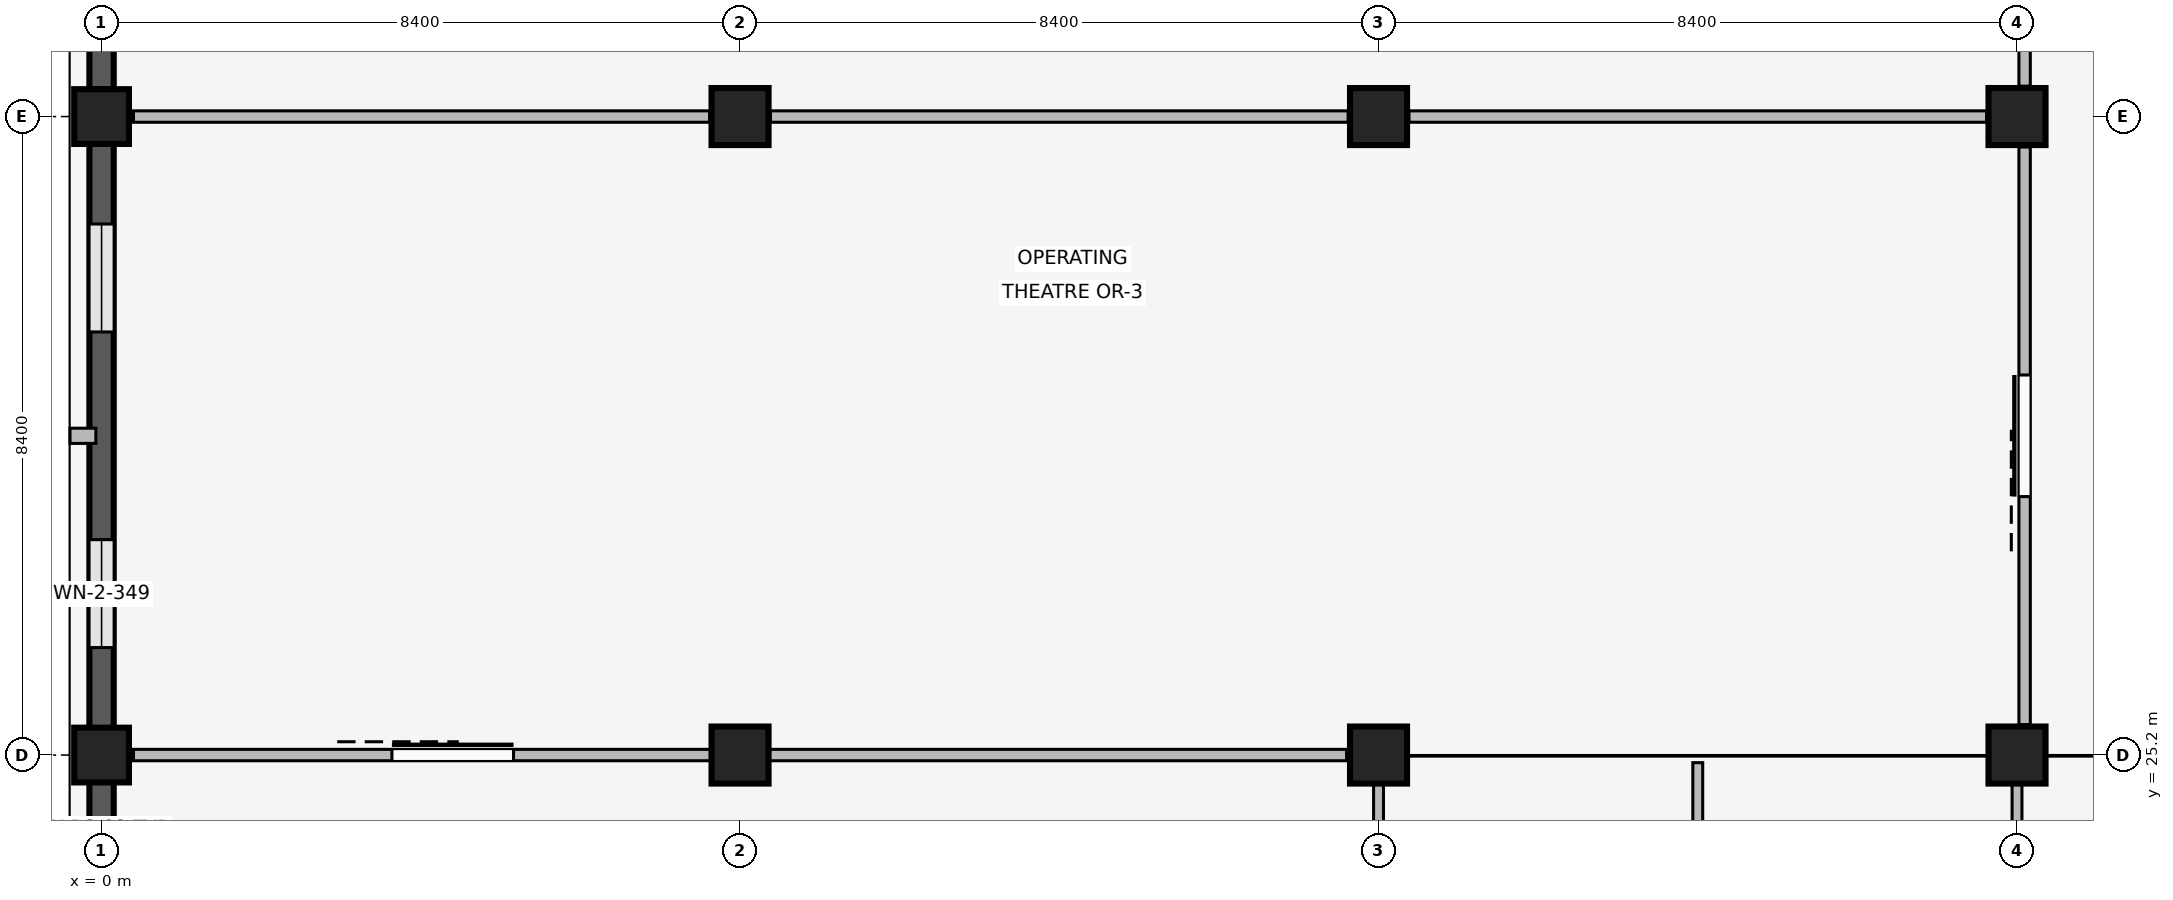
"""IFC4 building model, lengths in metres.
Left out: names, types, materials, properties, quantities, classifications, styles, units other than length and angle.
Written with IfcOpenShell. Run it as: python <this file> out.ifc"""

import sys

from ifc_helpers import new_model, si_unit, direction, frame, frame_2d, origin, origin_2d, place, context, subcontext, project, spatial, rectangle, extrude, element, fill, save


model = new_model("IFC4")
c1 = context("Model", 3, precision=1e-05, world=origin(), true_north=direction((0.0, 1.0)))
c2 = subcontext(c1, "Body", "Model", "MODEL_VIEW")
j1 = project(units=[si_unit("LENGTHUNIT", "METRE"), si_unit("PLANEANGLEUNIT", "RADIAN")], contexts=[c1])
p1 = place(None, origin())
s1 = spatial("IfcSite", under=j1, at=p1, CompositionType="ELEMENT")
p2 = place(p1, origin())
s2 = spatial("IfcBuilding", under=s1, at=p2, CompositionType="ELEMENT")
p3 = place(p2, frame((0.0, 0.0, 8.1)))
s3 = spatial("IfcBuildingStorey", under=s2, at=p3, CompositionType="ELEMENT", Elevation=8.1)
for number, where, z_axis, x_axis in (
    (1, (0.0, 25.2, 0.0), (0.0, 0.0, 1.0), (1.0, 0.0, 0.0)),
    (2, (0.0, 33.6, 0.0), (0.0, 0.0, 1.0), (1.0, 0.0, 0.0)),
):
    element("IfcColumn", number, at=place(p3, frame(where, z_axis=z_axis, x_axis=x_axis)), inside=s3, PredefinedType="COLUMN", context=c2, shape_type="SweptSolid", body=[
        extrude(rectangle(XDim=0.72, YDim=0.72, at=origin_2d()), origin(), (0.0, 0.0, 1.0), 4.8),
    ])
for number, where, z_axis, x_axis in (
    (3, (8.4, 25.2, 0.0), (0.0, 0.0, 1.0), (1.0, 0.0, 0.0)),
    (4, (8.4, 33.6, 0.0), (0.0, 0.0, 1.0), (1.0, 0.0, 0.0)),
    (5, (16.8, 25.2, 0.0), (0.0, 0.0, 1.0), (1.0, 0.0, 0.0)),
    (6, (16.8, 33.6, 0.0), (0.0, 0.0, 1.0), (1.0, 0.0, 0.0)),
    (7, (25.2, 25.2, 0.0), (0.0, 0.0, 1.0), (1.0, 0.0, 0.0)),
    (8, (25.2, 33.6, 0.0), (0.0, 0.0, 1.0), (1.0, 0.0, 0.0)),
):
    element("IfcColumn", number, at=place(p3, frame(where, z_axis=z_axis, x_axis=x_axis)), inside=s3, PredefinedType="COLUMN", context=c2, shape_type="SweptSolid", body=[
        extrude(rectangle(XDim=0.75, YDim=0.75, at=origin_2d()), origin(), (0.0, 0.0, 1.0), 4.8),
    ])
p4 = place(p3, frame((0.0, 17.155, 0.0), z_axis=(0.0, 0.0, 1.0), x_axis=(0.0, 1.0, 0.0)))
e9 = element("IfcWall", 9, at=p4, inside=s3, PredefinedType="SOLIDWALL", context=c2, shape_type="SweptSolid", body=[
    extrude(rectangle(XDim=7.69, YDim=0.32, at=frame_2d((3.845, 0.0))), origin(), (0.0, 0.0, 1.0), 3.86),
])
p5 = place(p4, frame((1.029, 0.0, 0.85)))
e10 = element("IfcOpeningElement", 10, at=p5, cuts=e9, PredefinedType="OPENING", context=c2, shape_type="SweptSolid", body=[
    extrude(rectangle(XDim=1.48, YDim=1.6, at=frame_2d((0.74, 0.8))), frame((0.0, 0.17, 0.0), z_axis=(0.0, -1.0, 0.0), x_axis=(1.0, 0.0, 0.0)), (0.0, 0.0, 1.0), 0.34),
])
p6 = place(p4, frame((5.181, 0.0, 0.85)))
e11 = element("IfcOpeningElement", 11, at=p6, cuts=e9, PredefinedType="OPENING", context=c2, shape_type="SweptSolid", body=[
    extrude(rectangle(XDim=1.48, YDim=1.6, at=frame_2d((0.74, 0.8))), frame((0.0, 0.17, 0.0), z_axis=(0.0, -1.0, 0.0), x_axis=(1.0, 0.0, 0.0)), (0.0, 0.0, 1.0), 0.34),
])
p7 = place(p3, frame((0.0, 25.555, 0.0), z_axis=(0.0, 0.0, 1.0), x_axis=(0.0, 1.0, 0.0)))
e12 = element("IfcWall", 12, at=p7, inside=s3, PredefinedType="SOLIDWALL", context=c2, shape_type="SweptSolid", body=[
    extrude(rectangle(XDim=7.69, YDim=0.32, at=frame_2d((3.845, 0.0))), origin(), (0.0, 0.0, 1.0), 3.86),
])
p8 = place(p7, frame((1.059, 0.0, 0.85)))
e13 = element("IfcOpeningElement", 13, at=p8, cuts=e12, PredefinedType="OPENING", context=c2, shape_type="SweptSolid", body=[
    extrude(rectangle(XDim=1.42, YDim=1.45, at=frame_2d((0.71, 0.725))), frame((0.0, 0.17, 0.0), z_axis=(0.0, -1.0, 0.0), x_axis=(1.0, 0.0, 0.0)), (0.0, 0.0, 1.0), 0.34),
])
p9 = place(p7, frame((5.211, 0.0, 0.85)))
e14 = element("IfcOpeningElement", 14, at=p9, cuts=e12, PredefinedType="OPENING", context=c2, shape_type="SweptSolid", body=[
    extrude(rectangle(XDim=1.42, YDim=1.45, at=frame_2d((0.71, 0.725))), frame((0.0, 0.17, 0.0), z_axis=(0.0, -1.0, 0.0), x_axis=(1.0, 0.0, 0.0)), (0.0, 0.0, 1.0), 0.34),
])
p10 = place(p3, frame((-0.075, 29.4, 0.0), z_axis=(0.0, 0.0, 1.0), x_axis=(-1.0, 0.0, 0.0)))
e15 = element("IfcWall", 15, at=p10, inside=s3, PredefinedType="ELEMENTEDWALL", context=c2, shape_type="SweptSolid", body=[
    extrude(rectangle(XDim=0.34, YDim=0.2, at=frame_2d((0.17, 0.0))), origin(), (0.0, 0.0, 1.0), 3.84),
])
p11 = place(p3, frame((0.0, 33.955, 0.0), z_axis=(0.0, 0.0, 1.0), x_axis=(0.0, 1.0, 0.0)))
e16 = element("IfcWall", 16, at=p11, inside=s3, PredefinedType="SOLIDWALL", context=c2, shape_type="SweptSolid", body=[
    extrude(rectangle(XDim=7.69, YDim=0.32, at=frame_2d((3.845, 0.0))), origin(), (0.0, 0.0, 1.0), 3.86),
])
p12 = place(p11, frame((0.939, 0.0, 0.85)))
e17 = element("IfcOpeningElement", 17, at=p12, cuts=e16, PredefinedType="OPENING", context=c2, shape_type="SweptSolid", body=[
    extrude(rectangle(XDim=1.66, YDim=1.95, at=frame_2d((0.83, 0.975))), frame((0.0, 0.17, 0.0), z_axis=(0.0, -1.0, 0.0), x_axis=(1.0, 0.0, 0.0)), (0.0, 0.0, 1.0), 0.34),
])
p13 = place(p11, frame((5.091, 0.0, 0.85)))
e18 = element("IfcOpeningElement", 18, at=p13, cuts=e16, PredefinedType="OPENING", context=c2, shape_type="SweptSolid", body=[
    extrude(rectangle(XDim=1.66, YDim=1.95, at=frame_2d((0.83, 0.975))), frame((0.0, 0.17, 0.0), z_axis=(0.0, -1.0, 0.0), x_axis=(1.0, 0.0, 0.0)), (0.0, 0.0, 1.0), 0.34),
])
p14 = place(p3, frame((16.8, 14.12, 0.0), z_axis=(0.0, 0.0, 1.0), x_axis=(0.0, 1.0, 0.0)))
e19 = element("IfcWall", 19, at=p14, inside=s3, PredefinedType="PARTITIONING", context=c2, shape_type="SweptSolid", body=[
    extrude(rectangle(XDim=10.94, YDim=0.13, at=frame_2d((5.47, 0.0))), origin(), (0.0, 0.0, 1.0), 3.84),
])
p15 = place(p3, frame((21.0, 14.17, 0.0), z_axis=(0.0, 0.0, 1.0), x_axis=(0.0, 1.0, 0.0)))
e20 = element("IfcWall", 20, at=p15, inside=s3, PredefinedType="PARTITIONING", context=c2, shape_type="SweptSolid", body=[
    extrude(rectangle(XDim=10.93, YDim=0.13, at=frame_2d((5.465, 0.0))), origin(), (0.0, 0.0, 1.0), 3.84),
])
p16 = place(p3, frame((25.2, 14.12, 0.0), z_axis=(0.0, 0.0, 1.0), x_axis=(0.0, 1.0, 0.0)))
e21 = element("IfcWall", 21, at=p16, inside=s3, PredefinedType="PARTITIONING", context=c2, shape_type="SweptSolid", body=[
    extrude(rectangle(XDim=10.94, YDim=0.13, at=frame_2d((5.47, 0.0))), origin(), (0.0, 0.0, 1.0), 3.84),
])
p17 = place(p3, frame((0.42, 25.2, 0.0), z_axis=(0.0, 0.0, 1.0), x_axis=(1.0, 0.0, 0.0)))
e22 = element("IfcWall", 22, at=p17, inside=s3, PredefinedType="PARTITIONING", context=c2, shape_type="SweptSolid", body=[
    extrude(rectangle(XDim=15.96, YDim=0.15, at=frame_2d((7.98, 0.0))), origin(), (0.0, 0.0, 1.0), 3.84),
])
p18 = place(p17, frame((3.4, 0.0, 0.0)))
e23 = element("IfcOpeningElement", 23, at=p18, cuts=e22, PredefinedType="OPENING", context=c2, shape_type="SweptSolid", body=[
    extrude(rectangle(XDim=1.6, YDim=2.35, at=frame_2d((0.8, 1.175))), frame((0.0, 0.085, 0.0), z_axis=(0.0, -1.0, 0.0), x_axis=(1.0, 0.0, 0.0)), (0.0, 0.0, 1.0), 0.17),
])
p19 = place(p3, frame((25.3, 25.6, 0.0), z_axis=(0.0, 0.0, 1.0), x_axis=(0.0, 1.0, 0.0)))
e24 = element("IfcWall", 24, at=p19, inside=s3, PredefinedType="PARTITIONING", context=c2, shape_type="SweptSolid", body=[
    extrude(rectangle(XDim=7.6, YDim=0.15, at=frame_2d((3.8, 0.0))), origin(), (0.0, 0.0, 1.0), 3.84),
])
p20 = place(p19, frame((3.0, 0.0, 0.0)))
e25 = element("IfcOpeningElement", 25, at=p20, cuts=e24, PredefinedType="OPENING", context=c2, shape_type="SweptSolid", body=[
    extrude(rectangle(XDim=1.6, YDim=2.35, at=frame_2d((0.8, 1.175))), frame((0.0, 0.085, 0.0), z_axis=(0.0, -1.0, 0.0), x_axis=(1.0, 0.0, 0.0)), (0.0, 0.0, 1.0), 0.17),
])
p21 = place(p3, frame((25.3, 34.0, 0.0), z_axis=(0.0, 0.0, 1.0), x_axis=(0.0, 1.0, 0.0)))
e26 = element("IfcWall", 26, at=p21, inside=s3, PredefinedType="PARTITIONING", context=c2, shape_type="SweptSolid", body=[
    extrude(rectangle(XDim=7.6, YDim=0.15, at=frame_2d((3.8, 0.0))), origin(), (0.0, 0.0, 1.0), 3.84),
])
p22 = place(p21, frame((3.0, 0.0, 0.0)))
e27 = element("IfcOpeningElement", 27, at=p22, cuts=e26, PredefinedType="OPENING", context=c2, shape_type="SweptSolid", body=[
    extrude(rectangle(XDim=1.6, YDim=2.35, at=frame_2d((0.8, 1.175))), frame((0.0, 0.085, 0.0), z_axis=(0.0, -1.0, 0.0), x_axis=(1.0, 0.0, 0.0)), (0.0, 0.0, 1.0), 0.17),
])
p23 = place(p3, frame((0.42, 33.6, 0.0), z_axis=(0.0, 0.0, 1.0), x_axis=(1.0, 0.0, 0.0)))
e28 = element("IfcWall", 28, at=p23, inside=s3, PredefinedType="PARTITIONING", context=c2, shape_type="SweptSolid", body=[
    extrude(rectangle(XDim=7.58, YDim=0.15, at=frame_2d((3.79, 0.0))), origin(), (0.0, 0.0, 1.0), 3.84),
])
p24 = place(p3, frame((8.8, 33.6, 0.0), z_axis=(0.0, 0.0, 1.0), x_axis=(1.0, 0.0, 0.0)))
e29 = element("IfcWall", 29, at=p24, inside=s3, PredefinedType="PARTITIONING", context=c2, shape_type="SweptSolid", body=[
    extrude(rectangle(XDim=7.6, YDim=0.15, at=frame_2d((3.8, 0.0))), origin(), (0.0, 0.0, 1.0), 3.84),
])
p25 = place(p3, frame((17.2, 33.6, 0.0), z_axis=(0.0, 0.0, 1.0), x_axis=(1.0, 0.0, 0.0)))
e30 = element("IfcWall", 30, at=p25, inside=s3, PredefinedType="PARTITIONING", context=c2, shape_type="SweptSolid", body=[
    extrude(rectangle(XDim=7.6, YDim=0.15, at=frame_2d((3.8, 0.0))), origin(), (0.0, 0.0, 1.0), 3.84),
])
p26 = place(p8, origin())
e31 = element("IfcWindow", 31, at=p26, inside=s3, PartitioningType="SINGLE_PANEL", PredefinedType="WINDOW", context=c2, shape_type="SweptSolid", body=[
    extrude(rectangle(XDim=1.42, YDim=1.45, at=frame_2d((0.71, 0.725))), frame((0.0, 0.03, 0.0), z_axis=(0.0, -1.0, 0.0), x_axis=(1.0, 0.0, 0.0)), (0.0, 0.0, 1.0), 0.06),
])
fill(e13, e31)
p27 = place(p9, origin())
e32 = element("IfcWindow", 32, at=p27, inside=s3, PartitioningType="SINGLE_PANEL", PredefinedType="WINDOW", context=c2, shape_type="SweptSolid", body=[
    extrude(rectangle(XDim=1.42, YDim=1.45, at=frame_2d((0.71, 0.725))), frame((0.0, 0.03, 0.0), z_axis=(0.0, -1.0, 0.0), x_axis=(1.0, 0.0, 0.0)), (0.0, 0.0, 1.0), 0.06),
])
fill(e14, e32)
p28 = place(p18, origin())
e33 = element("IfcDoor", 33, at=p28, inside=s3, OperationType="SLIDING_TO_LEFT", PredefinedType="DOOR", context=c2, shape_type="SweptSolid", body=[
    extrude(rectangle(XDim=1.6, YDim=2.35, at=frame_2d((0.8, 1.175))), frame((0.0, 0.025, 0.0), z_axis=(0.0, -1.0, 0.0), x_axis=(1.0, 0.0, 0.0)), (0.0, 0.0, 1.0), 0.05),
])
fill(e23, e33)
p29 = place(p20, origin())
e34 = element("IfcDoor", 34, at=p29, inside=s3, OperationType="SLIDING_TO_LEFT", PredefinedType="DOOR", context=c2, shape_type="SweptSolid", body=[
    extrude(rectangle(XDim=1.6, YDim=2.35, at=frame_2d((0.8, 1.175))), frame((0.0, 0.025, 0.0), z_axis=(0.0, -1.0, 0.0), x_axis=(1.0, 0.0, 0.0)), (0.0, 0.0, 1.0), 0.05),
])
fill(e25, e34)
save(model, sys.argv[1])
